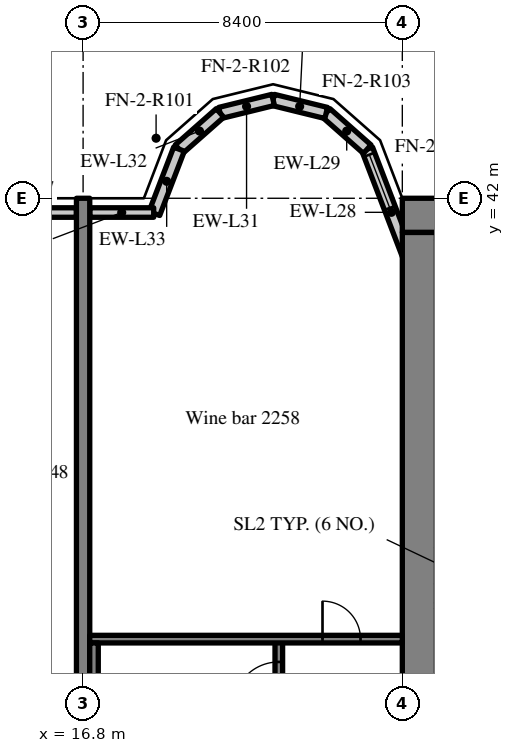
"""IFC4 building model, lengths in metres.
Left out: names, types, materials, properties, quantities, classifications, styles, units other than length and angle.
Written with IfcOpenShell. Run it as: python <this file> out.ifc"""

import sys

from ifc_helpers import new_model, si_unit, direction, frame, frame_2d, origin, place, context, subcontext, project, spatial, rectangle, extrude, source, transform, mapped, element, fill, save


model = new_model("IFC4")
c1 = context("Model", 3, precision=1e-05, world=origin(), true_north=direction((0.0, 1.0)))
c2 = subcontext(c1, "Body", "Model", "MODEL_VIEW")
j1 = project(units=[si_unit("LENGTHUNIT", "METRE"), si_unit("PLANEANGLEUNIT", "RADIAN")], contexts=[c1])
p1 = place(None, origin())
s1 = spatial("IfcSite", under=j1, at=p1, CompositionType="ELEMENT")
p2 = place(p1, origin())
s2 = spatial("IfcBuilding", under=s1, at=p2, CompositionType="ELEMENT")
p3 = place(p2, frame((0.0, 0.0, 95.2)))
s3 = spatial("IfcBuildingStorey", under=s2, at=p3, CompositionType="ELEMENT", Elevation=95.2)
m1 = source(origin(), c2, "Body", "SweptSolid", [
    extrude(rectangle(XDim=50.4, YDim=0.9, at=frame_2d((25.2, 0.0))), origin(), (0.0, 0.0, 1.0), 3.52),
])
p4 = place(p3, frame((25.2, 41.55, 0.0), z_axis=(0.0, 0.0, 1.0), x_axis=(1.0, 0.0, 0.0)))
e1 = element("IfcWall", 1, at=p4, inside=s3, PredefinedType="SHEAR", context=c2, shape_type="MappedRepresentation", body=[
    mapped(m1, transform((0.0, 0.0, 0.0), scale=1.0)),
])
m2 = source(origin(), c2, "Body", "SweptSolid", [
    extrude(rectangle(XDim=18.2, YDim=0.9, at=frame_2d((9.1, 0.0))), origin(), (0.0, 0.0, 1.0), 3.52),
])
p5 = place(p3, frame((25.65, 22.9, 0.0), z_axis=(0.0, 0.0, 1.0), x_axis=(0.0, 1.0, 0.0)))
e2 = element("IfcWall", 2, at=p5, inside=s3, PredefinedType="SHEAR", context=c2, shape_type="MappedRepresentation", body=[
    mapped(m2, transform((0.0, 0.0, 0.0), scale=1.0)),
])
m3 = source(origin(), c2, "Body", "SweptSolid", [
    extrude(rectangle(XDim=20.0, YDim=0.35, at=frame_2d((10.0, 0.0))), origin(), (0.0, 0.0, 1.0), 3.52),
])
p6 = place(p3, frame((16.8, 22.0, 0.0), z_axis=(0.0, 0.0, 1.0), x_axis=(0.0, 1.0, 0.0)))
e3 = element("IfcWall", 3, at=p6, inside=s3, PredefinedType="SHEAR", context=c2, shape_type="MappedRepresentation", body=[
    mapped(m3, transform((0.0, 0.0, 0.0), scale=1.0)),
])
m4 = source(origin(), c2, "Body", "SweptSolid", [
    extrude(rectangle(XDim=3.559, YDim=0.3, at=frame_2d((1.78, 0.0))), origin(), (0.0, 0.0, 1.0), 3.52),
])
p7 = place(p3, frame((25.55, 39.969, 0.0), z_axis=(0.0, 0.0, 1.0), x_axis=(-0.35779745313, 0.933799219604, 0.0)))
e4 = element("IfcWall", 4, at=p7, inside=s3, PredefinedType="SOLIDWALL", context=c2, shape_type="MappedRepresentation", body=[
    mapped(m4, transform((0.0, 0.0, 0.0), scale=1.0)),
])
m5 = source(origin(), c2, "Body", "SweptSolid", [
    extrude(rectangle(XDim=1.5, YDim=2.0, at=frame_2d((0.75, 1.0))), frame((0.0, 0.16, 0.0), z_axis=(0.0, -1.0, 0.0), x_axis=(1.0, 0.0, 0.0)), (0.0, 0.0, 1.0), 0.32),
])
p8 = place(p7, frame((1.903, 0.0, 0.9)))
e5 = element("IfcOpeningElement", 5, at=p8, cuts=e4, PredefinedType="OPENING", context=c2, shape_type="MappedRepresentation", body=[
    mapped(m5, transform((0.0, 0.0, 0.0), scale=1.0)),
])
m6 = source(origin(), c2, "Body", "SweptSolid", [
    extrude(rectangle(XDim=1.44, YDim=0.3, at=frame_2d((0.72, 0.0))), origin(), (0.0, 0.0, 1.0), 3.52),
])
p9 = place(p3, frame((24.277, 43.292, 0.0), z_axis=(0.0, 0.0, 1.0), x_axis=(-0.749649827867, 0.661834673902, 0.0)))
e6 = element("IfcWall", 6, at=p9, inside=s3, PredefinedType="SOLIDWALL", context=c2, shape_type="MappedRepresentation", body=[
    mapped(m6, transform((0.0, 0.0, 0.0), scale=1.0)),
])
m7 = source(origin(), c2, "Body", "SweptSolid", [
    extrude(rectangle(XDim=1.438, YDim=0.3, at=frame_2d((0.719, 0.0))), origin(), (0.0, 0.0, 1.0), 3.52),
])
p10 = place(p3, frame((23.197, 44.245, 0.0), z_axis=(0.0, 0.0, 1.0), x_axis=(-0.971152283879, 0.238460146601, 0.0)))
e7 = element("IfcWall", 7, at=p10, inside=s3, PredefinedType="SOLIDWALL", context=c2, shape_type="MappedRepresentation", body=[
    mapped(m7, transform((0.0, 0.0, 0.0), scale=1.0)),
])
m8 = source(origin(), c2, "Body", "SweptSolid", [
    extrude(rectangle(XDim=1.439, YDim=0.3, at=frame_2d((0.719, 0.0))), origin(), (0.0, 0.0, 1.0), 3.52),
])
p11 = place(p3, frame((21.8, 44.588, 0.0), z_axis=(0.0, 0.0, 1.0), x_axis=(-0.971161932466, -0.238420848351, 0.0)))
e8 = element("IfcWall", 8, at=p11, inside=s3, PredefinedType="SOLIDWALL", context=c2, shape_type="MappedRepresentation", body=[
    mapped(m8, transform((0.0, 0.0, 0.0), scale=1.0)),
])
m9 = source(origin(), c2, "Body", "SweptSolid", [
    extrude(rectangle(XDim=1.44, YDim=0.3, at=frame_2d((0.72, 0.0))), origin(), (0.0, 0.0, 1.0), 3.52),
])
p12 = place(p3, frame((20.403, 44.245, 0.0), z_axis=(0.0, 0.0, 1.0), x_axis=(-0.74957555648, -0.661918790432, 0.0)))
e9 = element("IfcWall", 9, at=p12, inside=s3, PredefinedType="SOLIDWALL", context=c2, shape_type="MappedRepresentation", body=[
    mapped(m9, transform((0.0, 0.0, 0.0), scale=1.0)),
])
m10 = source(origin(), c2, "Body", "SweptSolid", [
    extrude(rectangle(XDim=1.812, YDim=0.3, at=frame_2d((0.906, 0.0))), origin(), (0.0, 0.0, 1.0), 3.52),
])
p13 = place(p3, frame((19.323, 43.292, 0.0), z_axis=(0.0, 0.0, 1.0), x_axis=(-0.357877270961, -0.93376863244, 0.0)))
e10 = element("IfcWall", 10, at=p13, inside=s3, PredefinedType="SOLIDWALL", context=c2, shape_type="MappedRepresentation", body=[
    mapped(m10, transform((0.0, 0.0, 0.0), scale=1.0)),
])
m11 = source(origin(), c2, "Body", "SweptSolid", [
    extrude(rectangle(XDim=3.675, YDim=0.25, at=frame_2d((1.837, 0.0))), origin(), (0.0, 0.0, 1.0), 2.82),
])
p14 = place(p3, frame((16.625, 41.625, 0.0), z_axis=(0.0, 0.0, 1.0), x_axis=(-1.0, 0.0, 0.0)))
e11 = element("IfcWall", 11, at=p14, inside=s3, PredefinedType="SOLIDWALL", context=c2, shape_type="MappedRepresentation", body=[
    mapped(m11, transform((0.0, 0.0, 0.0), scale=1.0)),
])
m12 = source(origin(), c2, "Body", "SweptSolid", [
    extrude(rectangle(XDim=1.5, YDim=1.5, at=frame_2d((0.75, 0.75))), frame((0.0, 0.135, 0.0), z_axis=(0.0, -1.0, 0.0), x_axis=(1.0, 0.0, 0.0)), (0.0, 0.0, 1.0), 0.27),
])
p15 = place(p14, frame((1.087, 0.0, 0.9)))
e12 = element("IfcOpeningElement", 12, at=p15, cuts=e11, PredefinedType="OPENING", context=c2, shape_type="MappedRepresentation", body=[
    mapped(m12, transform((0.0, 0.0, 0.0), scale=1.0)),
])
m13 = source(origin(), c2, "Body", "SweptSolid", [
    extrude(rectangle(XDim=1.683, YDim=0.25, at=frame_2d((0.841, 0.0))), origin(), (0.0, 0.0, 1.0), 2.82),
])
p16 = place(p3, frame((18.658, 41.625, 0.0), z_axis=(0.0, 0.0, 1.0), x_axis=(-1.0, 0.0, 0.0)))
e13 = element("IfcWall", 13, at=p16, inside=s3, PredefinedType="SOLIDWALL", context=c2, shape_type="MappedRepresentation", body=[
    mapped(m13, transform((0.0, 0.0, 0.0), scale=1.0)),
])
m14 = source(origin(), c2, "Body", "SweptSolid", [
    extrude(rectangle(XDim=8.3, YDim=0.2, at=frame_2d((4.15, 0.0))), origin(), (0.0, 0.0, 1.0), 3.52),
])
p17 = place(p3, frame((21.95, 22.1, 0.0), z_axis=(0.0, 0.0, 1.0), x_axis=(0.0, 1.0, 0.0)))
e14 = element("IfcWall", 14, at=p17, inside=s3, PredefinedType="SOLIDWALL", context=c2, shape_type="MappedRepresentation", body=[
    mapped(m14, transform((0.0, 0.0, 0.0), scale=1.0)),
])
m15 = source(origin(), c2, "Body", "SweptSolid", [
    extrude(rectangle(XDim=1.2, YDim=2.1, at=frame_2d((0.6, 1.05))), frame((0.0, 0.11, 0.0), z_axis=(0.0, -1.0, 0.0), x_axis=(1.0, 0.0, 0.0)), (0.0, 0.0, 1.0), 0.22),
])
p18 = place(p17, frame((6.5, 0.0, 0.0)))
e15 = element("IfcOpeningElement", 15, at=p18, cuts=e14, PredefinedType="OPENING", context=c2, shape_type="MappedRepresentation", body=[
    mapped(m15, transform((0.0, 0.0, 0.0), scale=1.0)),
])
m16 = source(origin(), c2, "Body", "SweptSolid", [
    extrude(rectangle(XDim=8.225, YDim=0.2, at=frame_2d((4.112, 0.0))), origin(), (0.0, 0.0, 1.0), 3.52),
])
p19 = place(p3, frame((16.975, 30.4, 0.0), z_axis=(0.0, 0.0, 1.0), x_axis=(1.0, 0.0, 0.0)))
e16 = element("IfcWall", 16, at=p19, inside=s3, PredefinedType="SOLIDWALL", context=c2, shape_type="MappedRepresentation", body=[
    mapped(m16, transform((0.0, 0.0, 0.0), scale=1.0)),
])
m17 = source(origin(), c2, "Body", "SweptSolid", [
    extrude(rectangle(XDim=1.0, YDim=2.1, at=frame_2d((0.5, 1.05))), frame((0.0, 0.11, 0.0), z_axis=(0.0, -1.0, 0.0), x_axis=(1.0, 0.0, 0.0)), (0.0, 0.0, 1.0), 0.22),
])
p20 = place(p19, frame((6.125, 0.0, 0.0)))
e17 = element("IfcOpeningElement", 17, at=p20, cuts=e16, PredefinedType="OPENING", context=c2, shape_type="MappedRepresentation", body=[
    mapped(m17, transform((0.0, 0.0, 0.0), scale=1.0)),
])
m18 = source(origin(), c2, "Body", "SweptSolid", [
    extrude(rectangle(XDim=8.1, YDim=0.225, at=frame_2d((4.05, 0.0))), origin(), (0.0, 0.0, 1.0), 3.52),
])
p21 = place(p3, frame((17.087, 22.2, 0.0), z_axis=(0.0, 0.0, 1.0), x_axis=(0.0, 1.0, 0.0)))
e18 = element("IfcWall", 18, at=p21, inside=s3, PredefinedType="SOLIDWALL", context=c2, shape_type="MappedRepresentation", body=[
    mapped(m18, transform((0.0, 0.0, 0.0), scale=1.0)),
])
m19 = source(origin(), c2, "Body", "SweptSolid", [
    extrude(rectangle(XDim=1.5, YDim=2.0, at=frame_2d((0.75, 1.0))), frame((0.0, 0.03, 0.0), z_axis=(0.0, -1.0, 0.0), x_axis=(1.0, 0.0, 0.0)), (0.0, 0.0, 1.0), 0.06),
])
p22 = place(p8, origin())
e19 = element("IfcWindow", 19, at=p22, inside=s3, PartitioningType="SINGLE_PANEL", PredefinedType="WINDOW", context=c2, shape_type="MappedRepresentation", body=[
    mapped(m19, transform((0.0, 0.0, 0.0), scale=1.0)),
])
fill(e5, e19)
m20 = source(origin(), c2, "Body", "SweptSolid", [
    extrude(rectangle(XDim=1.2, YDim=2.1, at=frame_2d((0.6, 1.05))), frame((0.0, 0.025, 0.0), z_axis=(0.0, -1.0, 0.0), x_axis=(1.0, 0.0, 0.0)), (0.0, 0.0, 1.0), 0.05),
])
p23 = place(p18, origin())
e20 = element("IfcDoor", 20, at=p23, inside=s3, OperationType="SINGLE_SWING_LEFT", PredefinedType="DOOR", context=c2, shape_type="MappedRepresentation", body=[
    mapped(m20, transform((0.0, 0.0, 0.0), scale=1.0)),
])
fill(e15, e20)
m21 = source(origin(), c2, "Body", "SweptSolid", [
    extrude(rectangle(XDim=1.0, YDim=2.1, at=frame_2d((0.5, 1.05))), frame((0.0, 0.025, 0.0), z_axis=(0.0, -1.0, 0.0), x_axis=(1.0, 0.0, 0.0)), (0.0, 0.0, 1.0), 0.05),
])
p24 = place(p20, origin())
e21 = element("IfcDoor", 21, at=p24, inside=s3, OperationType="SINGLE_SWING_LEFT", PredefinedType="DOOR", context=c2, shape_type="MappedRepresentation", body=[
    mapped(m21, transform((0.0, 0.0, 0.0), scale=1.0)),
])
fill(e17, e21)
save(model, sys.argv[1])
